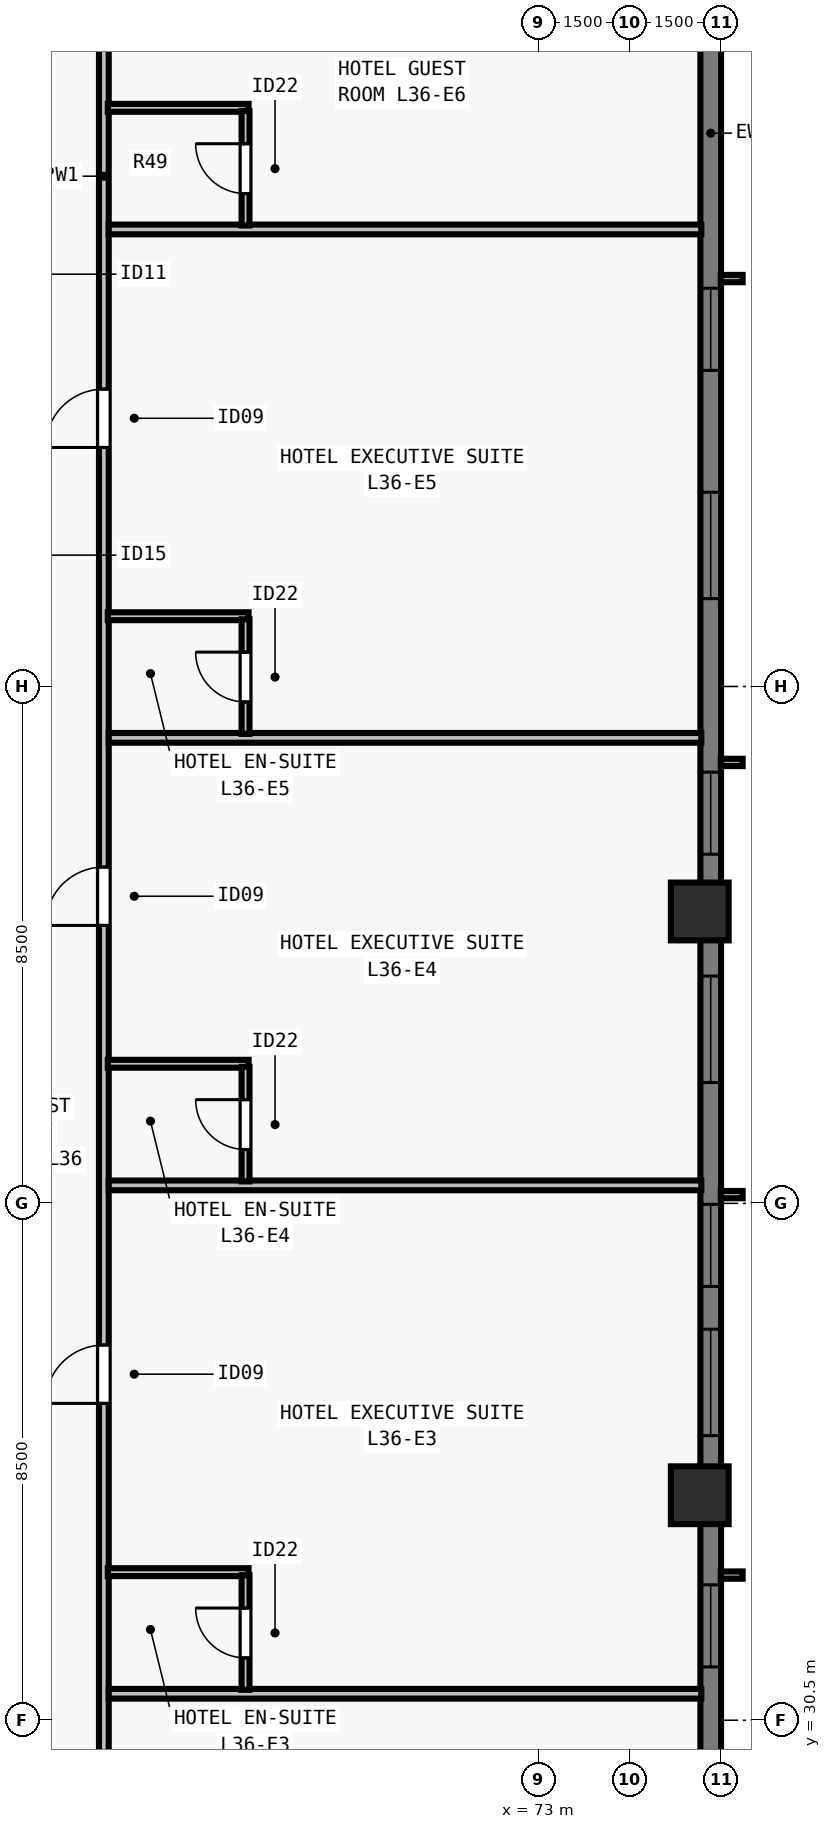
"""IFC4 building model, lengths in metres.
Left out: names, types, materials, properties, quantities, classifications, styles, units other than length and angle.
Written with IfcOpenShell. Run it as: python <this file> out.ifc"""

import sys

from ifc_helpers import new_model, si_unit, direction, frame, frame_2d, origin, origin_2d, place, context, subcontext, project, spatial, rectangle, extrude, element, fill, save


model = new_model("IFC4")
c1 = context("Model", 3, precision=1e-05, world=origin(), true_north=direction((0.0, 1.0)))
c2 = subcontext(c1, "Body", "Model", "MODEL_VIEW")
j1 = project(units=[si_unit("LENGTHUNIT", "METRE"), si_unit("PLANEANGLEUNIT", "RADIAN")], contexts=[c1])
p1 = place(None, origin())
s1 = spatial("IfcSite", under=j1, at=p1, CompositionType="ELEMENT")
p2 = place(p1, origin())
s2 = spatial("IfcBuilding", under=s1, at=p2, CompositionType="ELEMENT")
p3 = place(p2, frame((0.0, 0.0, 134.0)))
s3 = spatial("IfcBuildingStorey", under=s2, at=p3, CompositionType="ELEMENT", Elevation=134.0)
for number, where, z_axis, x_axis in (
    (1, (75.65, 34.2, 0.0), (0.0, 0.0, 1.0), (0.0, 1.0, 0.0)),
    (2, (75.65, 43.8, 0.0), (0.0, 0.0, 1.0), (0.0, 1.0, 0.0)),
):
    element("IfcColumn", number, at=place(p3, frame(where, z_axis=z_axis, x_axis=x_axis)), inside=s3, PredefinedType="COLUMN", context=c2, shape_type="SweptSolid", body=[
        extrude(rectangle(XDim=0.95, YDim=0.95, at=origin_2d()), origin(), (0.0, 0.0, 1.0), 3.5),
    ])
p4 = place(p3, frame((75.83, 59.0, 0.0), z_axis=(0.0, 0.0, 1.0), x_axis=(0.0, -1.0, 0.0)))
e3 = element("IfcWall", 3, at=p4, inside=s3, PredefinedType="SOLIDWALL", context=c2, shape_type="SweptSolid", body=[
    extrude(rectangle(XDim=39.682, YDim=0.34, at=frame_2d((19.841, 0.0))), origin(), (0.0, 0.0, 1.0), 3.28),
])
p5 = place(p4, frame((4.952, 0.0, 0.8)))
e4 = element("IfcOpeningElement", 4, at=p5, cuts=e3, PredefinedType="OPENING", context=c2, shape_type="SweptSolid", body=[
    extrude(rectangle(XDim=1.35, YDim=1.66, at=frame_2d((0.675, 0.83))), frame((0.0, 0.18, 0.0), z_axis=(0.0, -1.0, 0.0), x_axis=(1.0, 0.0, 0.0)), (0.0, 0.0, 1.0), 0.36),
])
p6 = place(p4, frame((8.305, 0.0, 0.8)))
e5 = element("IfcOpeningElement", 5, at=p6, cuts=e3, PredefinedType="OPENING", context=c2, shape_type="SweptSolid", body=[
    extrude(rectangle(XDim=1.75, YDim=1.66, at=frame_2d((0.875, 0.83))), frame((0.0, 0.18, 0.0), z_axis=(0.0, -1.0, 0.0), x_axis=(1.0, 0.0, 0.0)), (0.0, 0.0, 1.0), 0.36),
])
p7 = place(p4, frame((12.909, 0.0, 0.8)))
e6 = element("IfcOpeningElement", 6, at=p7, cuts=e3, PredefinedType="OPENING", context=c2, shape_type="SweptSolid", body=[
    extrude(rectangle(XDim=1.35, YDim=1.66, at=frame_2d((0.675, 0.83))), frame((0.0, 0.18, 0.0), z_axis=(0.0, -1.0, 0.0), x_axis=(1.0, 0.0, 0.0)), (0.0, 0.0, 1.0), 0.36),
])
p8 = place(p4, frame((16.262, 0.0, 0.8)))
e7 = element("IfcOpeningElement", 7, at=p8, cuts=e3, PredefinedType="OPENING", context=c2, shape_type="SweptSolid", body=[
    extrude(rectangle(XDim=1.75, YDim=1.66, at=frame_2d((0.875, 0.83))), frame((0.0, 0.18, 0.0), z_axis=(0.0, -1.0, 0.0), x_axis=(1.0, 0.0, 0.0)), (0.0, 0.0, 1.0), 0.36),
])
p9 = place(p4, frame((20.016, 0.0, 0.8)))
e8 = element("IfcOpeningElement", 8, at=p9, cuts=e3, PredefinedType="OPENING", context=c2, shape_type="SweptSolid", body=[
    extrude(rectangle(XDim=1.35, YDim=1.66, at=frame_2d((0.675, 0.83))), frame((0.0, 0.18, 0.0), z_axis=(0.0, -1.0, 0.0), x_axis=(1.0, 0.0, 0.0)), (0.0, 0.0, 1.0), 0.36),
])
p10 = place(p4, frame((22.07, 0.0, 0.8)))
e9 = element("IfcOpeningElement", 9, at=p10, cuts=e3, PredefinedType="OPENING", context=c2, shape_type="SweptSolid", body=[
    extrude(rectangle(XDim=1.75, YDim=1.66, at=frame_2d((0.875, 0.83))), frame((0.0, 0.18, 0.0), z_axis=(0.0, -1.0, 0.0), x_axis=(1.0, 0.0, 0.0)), (0.0, 0.0, 1.0), 0.36),
])
p11 = place(p4, frame((26.273, 0.0, 0.8)))
e10 = element("IfcOpeningElement", 10, at=p11, cuts=e3, PredefinedType="OPENING", context=c2, shape_type="SweptSolid", body=[
    extrude(rectangle(XDim=1.35, YDim=1.66, at=frame_2d((0.675, 0.83))), frame((0.0, 0.18, 0.0), z_axis=(0.0, -1.0, 0.0), x_axis=(1.0, 0.0, 0.0)), (0.0, 0.0, 1.0), 0.36),
])
p12 = place(p4, frame((29.627, 0.0, 0.8)))
e11 = element("IfcOpeningElement", 11, at=p12, cuts=e3, PredefinedType="OPENING", context=c2, shape_type="SweptSolid", body=[
    extrude(rectangle(XDim=1.75, YDim=1.66, at=frame_2d((0.875, 0.83))), frame((0.0, 0.18, 0.0), z_axis=(0.0, -1.0, 0.0), x_axis=(1.0, 0.0, 0.0)), (0.0, 0.0, 1.0), 0.36),
])
p13 = place(p4, frame((33.38, 0.0, 0.8)))
e12 = element("IfcOpeningElement", 12, at=p13, cuts=e3, PredefinedType="OPENING", context=c2, shape_type="SweptSolid", body=[
    extrude(rectangle(XDim=1.35, YDim=1.66, at=frame_2d((0.675, 0.83))), frame((0.0, 0.18, 0.0), z_axis=(0.0, -1.0, 0.0), x_axis=(1.0, 0.0, 0.0)), (0.0, 0.0, 1.0), 0.36),
])
p14 = place(p4, frame((35.83, 0.0, 0.8)))
e13 = element("IfcOpeningElement", 13, at=p14, cuts=e3, PredefinedType="OPENING", context=c2, shape_type="SweptSolid", body=[
    extrude(rectangle(XDim=0.9, YDim=1.66, at=frame_2d((0.45, 0.83))), frame((0.0, 0.18, 0.0), z_axis=(0.0, -1.0, 0.0), x_axis=(1.0, 0.0, 0.0)), (0.0, 0.0, 1.0), 0.36),
])
p15 = place(p3, frame((65.85, 15.325, 0.0), z_axis=(0.0, 0.0, 1.0), x_axis=(0.0, 1.0, 0.0)))
e14 = element("IfcWall", 14, at=p15, inside=s3, PredefinedType="PARTITIONING", context=c2, shape_type="SweptSolid", body=[
    extrude(rectangle(XDim=47.35, YDim=0.16, at=frame_2d((23.675, 0.0))), origin(), (0.0, 0.0, 1.0), 2.555),
])
p16 = place(p15, frame((4.993, 0.0, 0.0)))
e15 = element("IfcOpeningElement", 15, at=p16, cuts=e14, PredefinedType="OPENING", context=c2, shape_type="SweptSolid", body=[
    extrude(rectangle(XDim=0.96, YDim=2.15, at=frame_2d((0.48, 1.075))), frame((0.0, 0.09, 0.0), z_axis=(0.0, -1.0, 0.0), x_axis=(1.0, 0.0, 0.0)), (0.0, 0.0, 1.0), 0.18),
])
p17 = place(p15, frame((12.525, 0.0, 0.0)))
e16 = element("IfcOpeningElement", 16, at=p17, cuts=e14, PredefinedType="OPENING", context=c2, shape_type="SweptSolid", body=[
    extrude(rectangle(XDim=0.96, YDim=2.15, at=frame_2d((0.48, 1.075))), frame((0.0, 0.09, 0.0), z_axis=(0.0, -1.0, 0.0), x_axis=(1.0, 0.0, 0.0)), (0.0, 0.0, 1.0), 0.18),
])
p18 = place(p15, frame((20.385, 0.0, 0.0)))
e17 = element("IfcOpeningElement", 17, at=p18, cuts=e14, PredefinedType="OPENING", context=c2, shape_type="SweptSolid", body=[
    extrude(rectangle(XDim=0.96, YDim=2.15, at=frame_2d((0.48, 1.075))), frame((0.0, 0.09, 0.0), z_axis=(0.0, -1.0, 0.0), x_axis=(1.0, 0.0, 0.0)), (0.0, 0.0, 1.0), 0.18),
])
p19 = place(p15, frame((28.246, 0.0, 0.0)))
e18 = element("IfcOpeningElement", 18, at=p19, cuts=e14, PredefinedType="OPENING", context=c2, shape_type="SweptSolid", body=[
    extrude(rectangle(XDim=0.96, YDim=2.15, at=frame_2d((0.48, 1.075))), frame((0.0, 0.09, 0.0), z_axis=(0.0, -1.0, 0.0), x_axis=(1.0, 0.0, 0.0)), (0.0, 0.0, 1.0), 0.18),
])
p20 = place(p15, frame((36.105, 0.0, 0.0)))
e19 = element("IfcOpeningElement", 19, at=p20, cuts=e14, PredefinedType="OPENING", context=c2, shape_type="SweptSolid", body=[
    extrude(rectangle(XDim=0.96, YDim=2.15, at=frame_2d((0.48, 1.075))), frame((0.0, 0.09, 0.0), z_axis=(0.0, -1.0, 0.0), x_axis=(1.0, 0.0, 0.0)), (0.0, 0.0, 1.0), 0.18),
])
p21 = place(p15, frame((44.068, 0.0, 0.0)))
e20 = element("IfcOpeningElement", 20, at=p21, cuts=e14, PredefinedType="OPENING", context=c2, shape_type="SweptSolid", body=[
    extrude(rectangle(XDim=0.96, YDim=2.15, at=frame_2d((0.48, 1.075))), frame((0.0, 0.09, 0.0), z_axis=(0.0, -1.0, 0.0), x_axis=(1.0, 0.0, 0.0)), (0.0, 0.0, 1.0), 0.18),
])
p22 = place(p3, frame((65.93, 30.935, 0.0), z_axis=(0.0, 0.0, 1.0), x_axis=(1.0, 0.0, 0.0)))
e21 = element("IfcWall", 21, at=p22, inside=s3, PredefinedType="PARTITIONING", context=c2, shape_type="SweptSolid", body=[
    extrude(rectangle(XDim=9.745, YDim=0.16, at=frame_2d((4.873, 0.0))), origin(), (0.0, 0.0, 1.0), 3.28),
])
p23 = place(p3, frame((65.915, 32.935, 0.0), z_axis=(0.0, 0.0, 1.0), x_axis=(1.0, 0.0, 0.0)))
e22 = element("IfcWall", 22, at=p23, inside=s3, PredefinedType="PLUMBINGWALL", context=c2, shape_type="SweptSolid", body=[
    extrude(rectangle(XDim=2.315, YDim=0.13, at=frame_2d((1.157, 0.0))), origin(), (0.0, 0.0, 1.0), 3.28),
])
p24 = place(p3, frame((68.18, 31.0, 0.0), z_axis=(0.0, 0.0, 1.0), x_axis=(0.0, 1.0, 0.0)))
e23 = element("IfcWall", 23, at=p24, inside=s3, PredefinedType="PLUMBINGWALL", context=c2, shape_type="SweptSolid", body=[
    extrude(rectangle(XDim=1.885, YDim=0.13, at=frame_2d((0.942, 0.0))), origin(), (0.0, 0.0, 1.0), 3.28),
])
p25 = place(p24, frame((0.525, 0.0, 0.0)))
e24 = element("IfcOpeningElement", 24, at=p25, cuts=e23, PredefinedType="OPENING", context=c2, shape_type="SweptSolid", body=[
    extrude(rectangle(XDim=0.82, YDim=2.1, at=frame_2d((0.41, 1.05))), frame((0.0, 0.075, 0.0), z_axis=(0.0, -1.0, 0.0), x_axis=(1.0, 0.0, 0.0)), (0.0, 0.0, 1.0), 0.15),
])
p26 = place(p3, frame((65.93, 39.296, 0.0), z_axis=(0.0, 0.0, 1.0), x_axis=(1.0, 0.0, 0.0)))
e25 = element("IfcWall", 25, at=p26, inside=s3, PredefinedType="PARTITIONING", context=c2, shape_type="SweptSolid", body=[
    extrude(rectangle(XDim=9.745, YDim=0.16, at=frame_2d((4.873, 0.0))), origin(), (0.0, 0.0, 1.0), 3.28),
])
p27 = place(p3, frame((65.915, 41.296, 0.0), z_axis=(0.0, 0.0, 1.0), x_axis=(1.0, 0.0, 0.0)))
e26 = element("IfcWall", 26, at=p27, inside=s3, PredefinedType="PLUMBINGWALL", context=c2, shape_type="SweptSolid", body=[
    extrude(rectangle(XDim=2.315, YDim=0.13, at=frame_2d((1.157, 0.0))), origin(), (0.0, 0.0, 1.0), 3.28),
])
p28 = place(p3, frame((68.18, 39.361, 0.0), z_axis=(0.0, 0.0, 1.0), x_axis=(0.0, 1.0, 0.0)))
e27 = element("IfcWall", 27, at=p28, inside=s3, PredefinedType="PLUMBINGWALL", context=c2, shape_type="SweptSolid", body=[
    extrude(rectangle(XDim=1.885, YDim=0.13, at=frame_2d((0.942, 0.0))), origin(), (0.0, 0.0, 1.0), 3.28),
])
p29 = place(p28, frame((0.525, 0.0, 0.0)))
e28 = element("IfcOpeningElement", 28, at=p29, cuts=e27, PredefinedType="OPENING", context=c2, shape_type="SweptSolid", body=[
    extrude(rectangle(XDim=0.82, YDim=2.1, at=frame_2d((0.41, 1.05))), frame((0.0, 0.075, 0.0), z_axis=(0.0, -1.0, 0.0), x_axis=(1.0, 0.0, 0.0)), (0.0, 0.0, 1.0), 0.15),
])
p30 = place(p3, frame((65.93, 46.655, 0.0), z_axis=(0.0, 0.0, 1.0), x_axis=(1.0, 0.0, 0.0)))
e29 = element("IfcWall", 29, at=p30, inside=s3, PredefinedType="PARTITIONING", context=c2, shape_type="SweptSolid", body=[
    extrude(rectangle(XDim=9.745, YDim=0.16, at=frame_2d((4.873, 0.0))), origin(), (0.0, 0.0, 1.0), 3.28),
])
p31 = place(p3, frame((65.915, 48.655, 0.0), z_axis=(0.0, 0.0, 1.0), x_axis=(1.0, 0.0, 0.0)))
e30 = element("IfcWall", 30, at=p31, inside=s3, PredefinedType="PLUMBINGWALL", context=c2, shape_type="SweptSolid", body=[
    extrude(rectangle(XDim=2.315, YDim=0.13, at=frame_2d((1.157, 0.0))), origin(), (0.0, 0.0, 1.0), 3.28),
])
p32 = place(p3, frame((68.18, 46.72, 0.0), z_axis=(0.0, 0.0, 1.0), x_axis=(0.0, 1.0, 0.0)))
e31 = element("IfcWall", 31, at=p32, inside=s3, PredefinedType="PLUMBINGWALL", context=c2, shape_type="SweptSolid", body=[
    extrude(rectangle(XDim=1.885, YDim=0.13, at=frame_2d((0.942, 0.0))), origin(), (0.0, 0.0, 1.0), 3.28),
])
p33 = place(p32, frame((0.525, 0.0, 0.0)))
e32 = element("IfcOpeningElement", 32, at=p33, cuts=e31, PredefinedType="OPENING", context=c2, shape_type="SweptSolid", body=[
    extrude(rectangle(XDim=0.82, YDim=2.1, at=frame_2d((0.41, 1.05))), frame((0.0, 0.075, 0.0), z_axis=(0.0, -1.0, 0.0), x_axis=(1.0, 0.0, 0.0)), (0.0, 0.0, 1.0), 0.15),
])
p34 = place(p3, frame((65.93, 55.016, 0.0), z_axis=(0.0, 0.0, 1.0), x_axis=(1.0, 0.0, 0.0)))
e33 = element("IfcWall", 33, at=p34, inside=s3, PredefinedType="PARTITIONING", context=c2, shape_type="SweptSolid", body=[
    extrude(rectangle(XDim=9.745, YDim=0.16, at=frame_2d((4.873, 0.0))), origin(), (0.0, 0.0, 1.0), 2.896),
])
p35 = place(p3, frame((65.915, 57.016, 0.0), z_axis=(0.0, 0.0, 1.0), x_axis=(1.0, 0.0, 0.0)))
e34 = element("IfcWall", 34, at=p35, inside=s3, PredefinedType="PLUMBINGWALL", context=c2, shape_type="SweptSolid", body=[
    extrude(rectangle(XDim=2.315, YDim=0.13, at=frame_2d((1.157, 0.0))), origin(), (0.0, 0.0, 1.0), 3.28),
])
p36 = place(p3, frame((68.18, 55.081, 0.0), z_axis=(0.0, 0.0, 1.0), x_axis=(0.0, 1.0, 0.0)))
e35 = element("IfcWall", 35, at=p36, inside=s3, PredefinedType="PLUMBINGWALL", context=c2, shape_type="SweptSolid", body=[
    extrude(rectangle(XDim=1.885, YDim=0.13, at=frame_2d((0.942, 0.0))), origin(), (0.0, 0.0, 1.0), 3.28),
])
p37 = place(p36, frame((0.525, 0.0, 0.0)))
e36 = element("IfcOpeningElement", 36, at=p37, cuts=e35, PredefinedType="OPENING", context=c2, shape_type="SweptSolid", body=[
    extrude(rectangle(XDim=0.82, YDim=2.1, at=frame_2d((0.41, 1.05))), frame((0.0, 0.075, 0.0), z_axis=(0.0, -1.0, 0.0), x_axis=(1.0, 0.0, 0.0)), (0.0, 0.0, 1.0), 0.15),
])
p38 = place(p5, origin())
e37 = element("IfcWindow", 37, at=p38, inside=s3, PartitioningType="SINGLE_PANEL", PredefinedType="WINDOW", context=c2, shape_type="SweptSolid", body=[
    extrude(rectangle(XDim=1.35, YDim=1.66, at=frame_2d((0.675, 0.83))), frame((0.0, -0.05, 0.0), z_axis=(0.0, -1.0, 0.0), x_axis=(1.0, 0.0, 0.0)), (0.0, 0.0, 1.0), 0.06),
])
fill(e4, e37)
p39 = place(p6, origin())
e38 = element("IfcWindow", 38, at=p39, inside=s3, PartitioningType="SINGLE_PANEL", PredefinedType="WINDOW", context=c2, shape_type="SweptSolid", body=[
    extrude(rectangle(XDim=1.75, YDim=1.66, at=frame_2d((0.875, 0.83))), frame((0.0, -0.05, 0.0), z_axis=(0.0, -1.0, 0.0), x_axis=(1.0, 0.0, 0.0)), (0.0, 0.0, 1.0), 0.06),
])
fill(e5, e38)
p40 = place(p7, origin())
e39 = element("IfcWindow", 39, at=p40, inside=s3, PartitioningType="SINGLE_PANEL", PredefinedType="WINDOW", context=c2, shape_type="SweptSolid", body=[
    extrude(rectangle(XDim=1.35, YDim=1.66, at=frame_2d((0.675, 0.83))), frame((0.0, -0.05, 0.0), z_axis=(0.0, -1.0, 0.0), x_axis=(1.0, 0.0, 0.0)), (0.0, 0.0, 1.0), 0.06),
])
fill(e6, e39)
p41 = place(p8, origin())
e40 = element("IfcWindow", 40, at=p41, inside=s3, PartitioningType="SINGLE_PANEL", PredefinedType="WINDOW", context=c2, shape_type="SweptSolid", body=[
    extrude(rectangle(XDim=1.75, YDim=1.66, at=frame_2d((0.875, 0.83))), frame((0.0, -0.05, 0.0), z_axis=(0.0, -1.0, 0.0), x_axis=(1.0, 0.0, 0.0)), (0.0, 0.0, 1.0), 0.06),
])
fill(e7, e40)
p42 = place(p9, origin())
e41 = element("IfcWindow", 41, at=p42, inside=s3, PartitioningType="SINGLE_PANEL", PredefinedType="WINDOW", context=c2, shape_type="SweptSolid", body=[
    extrude(rectangle(XDim=1.35, YDim=1.66, at=frame_2d((0.675, 0.83))), frame((0.0, -0.05, 0.0), z_axis=(0.0, -1.0, 0.0), x_axis=(1.0, 0.0, 0.0)), (0.0, 0.0, 1.0), 0.06),
])
fill(e8, e41)
p43 = place(p10, origin())
e42 = element("IfcWindow", 42, at=p43, inside=s3, PartitioningType="SINGLE_PANEL", PredefinedType="WINDOW", context=c2, shape_type="SweptSolid", body=[
    extrude(rectangle(XDim=1.75, YDim=1.66, at=frame_2d((0.875, 0.83))), frame((0.0, -0.05, 0.0), z_axis=(0.0, -1.0, 0.0), x_axis=(1.0, 0.0, 0.0)), (0.0, 0.0, 1.0), 0.06),
])
fill(e9, e42)
p44 = place(p11, origin())
e43 = element("IfcWindow", 43, at=p44, inside=s3, PartitioningType="SINGLE_PANEL", PredefinedType="WINDOW", context=c2, shape_type="SweptSolid", body=[
    extrude(rectangle(XDim=1.35, YDim=1.66, at=frame_2d((0.675, 0.83))), frame((0.0, -0.05, 0.0), z_axis=(0.0, -1.0, 0.0), x_axis=(1.0, 0.0, 0.0)), (0.0, 0.0, 1.0), 0.06),
])
fill(e10, e43)
p45 = place(p25, origin())
e44 = element("IfcDoor", 44, at=p45, inside=s3, OperationType="SINGLE_SWING_RIGHT", PredefinedType="DOOR", context=c2, shape_type="SweptSolid", body=[
    extrude(rectangle(XDim=0.82, YDim=2.1, at=frame_2d((0.41, 1.05))), frame((0.0, 0.025, 0.0), z_axis=(0.0, -1.0, 0.0), x_axis=(1.0, 0.0, 0.0)), (0.0, 0.0, 1.0), 0.05),
])
fill(e24, e44)
p46 = place(p18, origin())
e45 = element("IfcDoor", 45, at=p46, inside=s3, OperationType="SINGLE_SWING_LEFT", PredefinedType="DOOR", context=c2, shape_type="SweptSolid", body=[
    extrude(rectangle(XDim=0.96, YDim=2.15, at=frame_2d((0.48, 1.075))), frame((0.0, 0.025, 0.0), z_axis=(0.0, -1.0, 0.0), x_axis=(1.0, 0.0, 0.0)), (0.0, 0.0, 1.0), 0.05),
])
fill(e17, e45)
p47 = place(p29, origin())
e46 = element("IfcDoor", 46, at=p47, inside=s3, OperationType="SINGLE_SWING_RIGHT", PredefinedType="DOOR", context=c2, shape_type="SweptSolid", body=[
    extrude(rectangle(XDim=0.82, YDim=2.1, at=frame_2d((0.41, 1.05))), frame((0.0, 0.025, 0.0), z_axis=(0.0, -1.0, 0.0), x_axis=(1.0, 0.0, 0.0)), (0.0, 0.0, 1.0), 0.05),
])
fill(e28, e46)
p48 = place(p19, origin())
e47 = element("IfcDoor", 47, at=p48, inside=s3, OperationType="SINGLE_SWING_LEFT", PredefinedType="DOOR", context=c2, shape_type="SweptSolid", body=[
    extrude(rectangle(XDim=0.96, YDim=2.15, at=frame_2d((0.48, 1.075))), frame((0.0, 0.025, 0.0), z_axis=(0.0, -1.0, 0.0), x_axis=(1.0, 0.0, 0.0)), (0.0, 0.0, 1.0), 0.05),
])
fill(e18, e47)
p49 = place(p33, origin())
e48 = element("IfcDoor", 48, at=p49, inside=s3, OperationType="SINGLE_SWING_RIGHT", PredefinedType="DOOR", context=c2, shape_type="SweptSolid", body=[
    extrude(rectangle(XDim=0.82, YDim=2.1, at=frame_2d((0.41, 1.05))), frame((0.0, 0.025, 0.0), z_axis=(0.0, -1.0, 0.0), x_axis=(1.0, 0.0, 0.0)), (0.0, 0.0, 1.0), 0.05),
])
fill(e32, e48)
p50 = place(p20, origin())
e49 = element("IfcDoor", 49, at=p50, inside=s3, OperationType="SINGLE_SWING_LEFT", PredefinedType="DOOR", context=c2, shape_type="SweptSolid", body=[
    extrude(rectangle(XDim=0.96, YDim=2.15, at=frame_2d((0.48, 1.075))), frame((0.0, 0.025, 0.0), z_axis=(0.0, -1.0, 0.0), x_axis=(1.0, 0.0, 0.0)), (0.0, 0.0, 1.0), 0.05),
])
fill(e19, e49)
p51 = place(p37, origin())
e50 = element("IfcDoor", 50, at=p51, inside=s3, OperationType="SINGLE_SWING_RIGHT", PredefinedType="DOOR", context=c2, shape_type="SweptSolid", body=[
    extrude(rectangle(XDim=0.82, YDim=2.1, at=frame_2d((0.41, 1.05))), frame((0.0, 0.025, 0.0), z_axis=(0.0, -1.0, 0.0), x_axis=(1.0, 0.0, 0.0)), (0.0, 0.0, 1.0), 0.05),
])
fill(e36, e50)
save(model, sys.argv[1])
